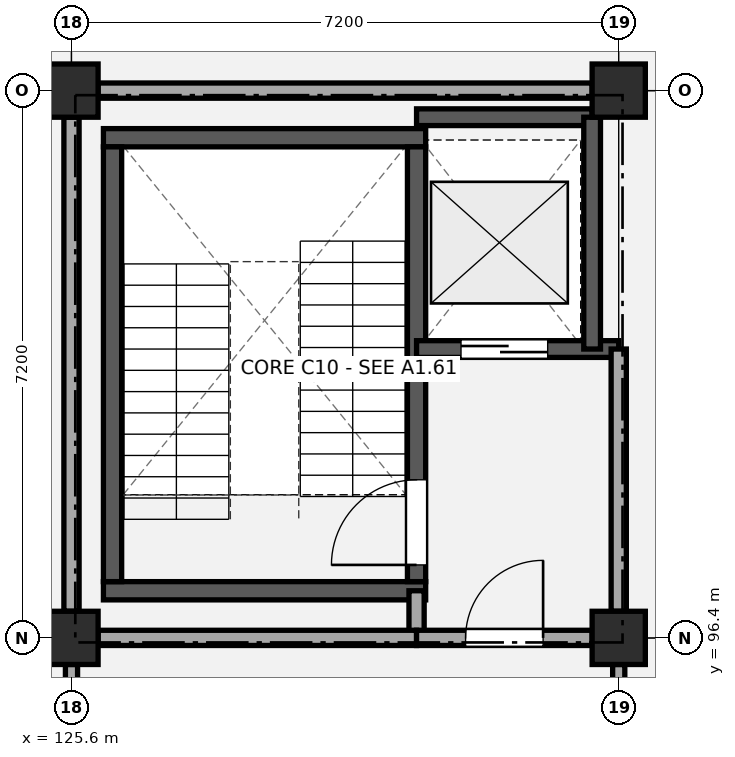
"""IFC4 building model, lengths in metres.
Left out: names, types, materials, properties, quantities, classifications, styles, units other than length and angle.
Written with IfcOpenShell. Run it as: python <this file> out.ifc"""

import sys

from ifc_helpers import new_model, si_unit, direction, frame, frame_2d, origin, origin_2d, place, context, subcontext, project, spatial, rectangle, extrude, element, fill, save


model = new_model("IFC4")
c1 = context("Model", 3, precision=1e-05, world=origin(), true_north=direction((0.0, 1.0)))
c2 = subcontext(c1, "Body", "Model", "MODEL_VIEW")
j1 = project(units=[si_unit("LENGTHUNIT", "METRE"), si_unit("PLANEANGLEUNIT", "RADIAN")], contexts=[c1])
p1 = place(None, origin())
s1 = spatial("IfcSite", under=j1, at=p1, CompositionType="ELEMENT")
p2 = place(p1, origin())
s2 = spatial("IfcBuilding", under=s1, at=p2, CompositionType="ELEMENT")
p3 = place(p2, frame((0.0, 0.0, 4.68)))
s3 = spatial("IfcBuildingStorey", under=s2, at=p3, CompositionType="ELEMENT", Elevation=4.68)
for number, where, z_axis, x_axis in (
    (1, (125.6, 96.4, 0.0), (0.0, 0.0, 1.0), (1.0, 0.0, 0.0)),
    (2, (125.6, 103.6, 0.0), (0.0, 0.0, 1.0), (1.0, 0.0, 0.0)),
    (3, (132.8, 96.4, 0.0), (0.0, 0.0, 1.0), (1.0, 0.0, 0.0)),
    (4, (132.8, 103.6, 0.0), (0.0, 0.0, 1.0), (1.0, 0.0, 0.0)),
):
    element("IfcColumn", number, at=place(p3, frame(where, z_axis=z_axis, x_axis=x_axis)), inside=s3, PredefinedType="COLUMN", context=c2, shape_type="SweptSolid", body=[
        extrude(rectangle(XDim=0.7, YDim=0.7, at=origin_2d()), origin(), (0.0, 0.0, 1.0), 4.5),
    ])
for number, where, z_axis, x_axis in (
    (5, (126.02, 97.02, 0.0), (0.0, 0.0, 1.0), (1.0, 0.0, 0.0)),
    (6, (126.02, 102.98, 0.0), (0.0, 0.0, 1.0), (1.0, 0.0, 0.0)),
):
    element("IfcWall", number, at=place(p3, frame(where, z_axis=z_axis, x_axis=x_axis)), inside=s3, PredefinedType="SHEAR", context=c2, shape_type="SweptSolid", body=[
        extrude(rectangle(XDim=4.24, YDim=0.24, at=frame_2d((2.12, 0.0))), origin(), (0.0, 0.0, 1.0), 4.2),
    ])
p4 = place(p3, frame((126.14, 97.14, 0.0), z_axis=(0.0, 0.0, 1.0), x_axis=(0.0, 1.0, 0.0)))
e7 = element("IfcWall", 7, at=p4, inside=s3, PredefinedType="SHEAR", context=c2, shape_type="SweptSolid", body=[
    extrude(rectangle(XDim=5.72, YDim=0.24, at=frame_2d((2.86, 0.0))), origin(), (0.0, 0.0, 1.0), 4.2),
])
p5 = place(p3, frame((130.14, 97.14, 0.0), z_axis=(0.0, 0.0, 1.0), x_axis=(0.0, 1.0, 0.0)))
e8 = element("IfcWall", 8, at=p5, inside=s3, PredefinedType="SHEAR", context=c2, shape_type="SweptSolid", body=[
    extrude(rectangle(XDim=5.72, YDim=0.24, at=frame_2d((2.86, 0.0))), origin(), (0.0, 0.0, 1.0), 4.2),
])
p6 = place(p5, frame((0.22, 0.0, 0.0)))
e9 = element("IfcOpeningElement", 9, at=p6, cuts=e8, PredefinedType="OPENING", context=c2, shape_type="SweptSolid", body=[
    extrude(rectangle(XDim=1.12, YDim=2.15, at=frame_2d((0.56, 1.075))), frame((0.0, 0.13, 0.0), z_axis=(0.0, -1.0, 0.0), x_axis=(1.0, 0.0, 0.0)), (0.0, 0.0, 1.0), 0.26),
])
p7 = place(p3, frame((130.14, 100.2, 0.0), z_axis=(0.0, 0.0, 1.0), x_axis=(1.0, 0.0, 0.0)))
e10 = element("IfcWall", 10, at=p7, inside=s3, PredefinedType="SHEAR", context=c2, shape_type="SweptSolid", body=[
    extrude(rectangle(XDim=2.66, YDim=0.22, at=frame_2d((1.33, 0.0))), origin(), (0.0, 0.0, 1.0), 4.2),
])
p8 = place(p7, frame((0.585, 0.0, 0.0)))
e11 = element("IfcOpeningElement", 11, at=p8, cuts=e10, PredefinedType="OPENING", context=c2, shape_type="SweptSolid", body=[
    extrude(rectangle(XDim=1.14, YDim=2.15, at=frame_2d((0.57, 1.075))), frame((0.0, 0.12, 0.0), z_axis=(0.0, -1.0, 0.0), x_axis=(1.0, 0.0, 0.0)), (0.0, 0.0, 1.0), 0.24),
])
p9 = place(p3, frame((130.14, 103.25, 0.0), z_axis=(0.0, 0.0, 1.0), x_axis=(1.0, 0.0, 0.0)))
e12 = element("IfcWall", 12, at=p9, inside=s3, PredefinedType="SHEAR", context=c2, shape_type="SweptSolid", body=[
    extrude(rectangle(XDim=2.31, YDim=0.22, at=frame_2d((1.155, 0.0))), origin(), (0.0, 0.0, 1.0), 4.2),
])
p10 = place(p3, frame((132.45, 100.2, 0.0), z_axis=(0.0, 0.0, 1.0), x_axis=(0.0, 1.0, 0.0)))
e13 = element("IfcWall", 13, at=p10, inside=s3, PredefinedType="SHEAR", context=c2, shape_type="SweptSolid", body=[
    extrude(rectangle(XDim=3.05, YDim=0.22, at=frame_2d((1.525, 0.0))), origin(), (0.0, 0.0, 1.0), 4.2),
])
p11 = place(p3, frame((130.14, 96.4, 0.0), z_axis=(0.0, 0.0, 1.0), x_axis=(0.0, 1.0, 0.0)))
e14 = element("IfcWall", 14, at=p11, inside=s3, PredefinedType="PARTITIONING", context=c2, shape_type="SweptSolid", body=[
    extrude(rectangle(XDim=0.62, YDim=0.2, at=frame_2d((0.31, 0.0))), origin(), (0.0, 0.0, 1.0), 3.54),
])
p12 = place(p3, frame((125.6, 96.75, 0.0), z_axis=(0.0, 0.0, 1.0), x_axis=(0.0, 1.0, 0.0)))
e15 = element("IfcWall", 15, at=p12, inside=s3, PredefinedType="PARTITIONING", context=c2, shape_type="SweptSolid", body=[
    extrude(rectangle(XDim=6.5, YDim=0.2, at=frame_2d((3.25, 0.0))), origin(), (0.0, 0.0, 1.0), 3.59),
])
p13 = place(p3, frame((132.8, 96.75, 0.0), z_axis=(0.0, 0.0, 1.0), x_axis=(0.0, 1.0, 0.0)))
e16 = element("IfcWall", 16, at=p13, inside=s3, PredefinedType="PARTITIONING", context=c2, shape_type="SweptSolid", body=[
    extrude(rectangle(XDim=3.45, YDim=0.2, at=frame_2d((1.725, 0.0))), origin(), (0.0, 0.0, 1.0), 3.59),
])
p14 = place(p3, frame((125.95, 96.4, 0.0), z_axis=(0.0, 0.0, 1.0), x_axis=(1.0, 0.0, 0.0)))
e17 = element("IfcWall", 17, at=p14, inside=s3, PredefinedType="PARTITIONING", context=c2, shape_type="SweptSolid", body=[
    extrude(rectangle(XDim=4.19, YDim=0.2, at=frame_2d((2.095, 0.0))), origin(), (0.0, 0.0, 1.0), 3.54),
])
p15 = place(p3, frame((130.14, 96.4, 0.0), z_axis=(0.0, 0.0, 1.0), x_axis=(1.0, 0.0, 0.0)))
e18 = element("IfcWall", 18, at=p15, inside=s3, PredefinedType="PARTITIONING", context=c2, shape_type="SweptSolid", body=[
    extrude(rectangle(XDim=2.31, YDim=0.2, at=frame_2d((1.155, 0.0))), origin(), (0.0, 0.0, 1.0), 3.54),
])
p16 = place(p15, frame((0.645, 0.0, 0.0)))
e19 = element("IfcOpeningElement", 19, at=p16, cuts=e18, PredefinedType="OPENING", context=c2, shape_type="SweptSolid", body=[
    extrude(rectangle(XDim=1.02, YDim=2.15, at=frame_2d((0.51, 1.075))), frame((0.0, 0.11, 0.0), z_axis=(0.0, -1.0, 0.0), x_axis=(1.0, 0.0, 0.0)), (0.0, 0.0, 1.0), 0.22),
])
p17 = place(p3, frame((125.95, 103.6, 0.0), z_axis=(0.0, 0.0, 1.0), x_axis=(1.0, 0.0, 0.0)))
e20 = element("IfcWall", 20, at=p17, inside=s3, PredefinedType="PARTITIONING", context=c2, shape_type="SweptSolid", body=[
    extrude(rectangle(XDim=6.5, YDim=0.2, at=frame_2d((3.25, 0.0))), origin(), (0.0, 0.0, 1.0), 3.59),
])
for number, where, z_axis, x_axis in (
    (21, (125.6, 89.55, 0.0), (0.0, 0.0, 1.0), (0.0, 1.0, 0.0)),
    (22, (132.8, 89.55, 0.0), (0.0, 0.0, 1.0), (0.0, 1.0, 0.0)),
):
    element("IfcWall", number, at=place(p3, frame(where, z_axis=z_axis, x_axis=x_axis)), inside=s3, PredefinedType="PARTITIONING", context=c2, shape_type="SweptSolid", body=[
        extrude(rectangle(XDim=6.5, YDim=0.16, at=frame_2d((3.25, 0.0))), origin(), (0.0, 0.0, 1.0), 3.54),
    ])
p18 = place(p6, origin())
e23 = element("IfcDoor", 23, at=p18, inside=s3, OperationType="SINGLE_SWING_LEFT", PredefinedType="DOOR", context=c2, shape_type="SweptSolid", body=[
    extrude(rectangle(XDim=1.12, YDim=2.15, at=frame_2d((0.56, 1.075))), frame((0.0, 0.025, 0.0), z_axis=(0.0, -1.0, 0.0), x_axis=(1.0, 0.0, 0.0)), (0.0, 0.0, 1.0), 0.05),
])
fill(e9, e23)
p19 = place(p8, origin())
e24 = element("IfcDoor", 24, at=p19, inside=s3, OperationType="SLIDING_TO_LEFT", PredefinedType="DOOR", context=c2, shape_type="SweptSolid", body=[
    extrude(rectangle(XDim=1.14, YDim=2.15, at=frame_2d((0.57, 1.075))), frame((0.0, 0.025, 0.0), z_axis=(0.0, -1.0, 0.0), x_axis=(1.0, 0.0, 0.0)), (0.0, 0.0, 1.0), 0.05),
])
fill(e11, e24)
p20 = place(p16, origin())
e25 = element("IfcDoor", 25, at=p20, inside=s3, OperationType="SINGLE_SWING_RIGHT", PredefinedType="DOOR", context=c2, shape_type="SweptSolid", body=[
    extrude(rectangle(XDim=1.02, YDim=2.15, at=frame_2d((0.51, 1.075))), frame((0.0, 0.025, 0.0), z_axis=(0.0, -1.0, 0.0), x_axis=(1.0, 0.0, 0.0)), (0.0, 0.0, 1.0), 0.05),
])
fill(e19, e25)
save(model, sys.argv[1])
